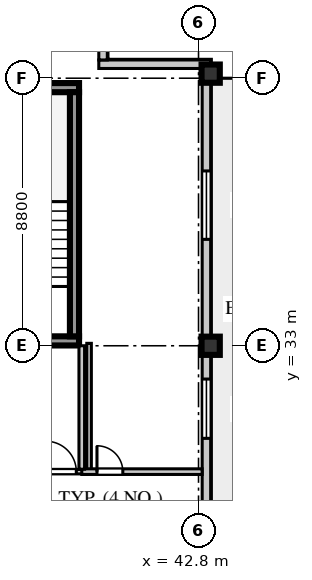
"""IFC4 building model, lengths in metres.
Left out: names, types, materials, properties, quantities, classifications, styles, units other than length and angle.
Written with IfcOpenShell. Run it as: python <this file> out.ifc"""

import sys

from ifc_helpers import new_model, si_unit, direction, frame, frame_2d, origin, origin_2d, place, context, subcontext, project, spatial, rectangle, extrude, element, fill, save


model = new_model("IFC4")
c1 = context("Model", 3, precision=1e-05, world=origin(), true_north=direction((0.0, 1.0)))
c2 = subcontext(c1, "Body", "Model", "MODEL_VIEW")
j1 = project(units=[si_unit("LENGTHUNIT", "METRE"), si_unit("PLANEANGLEUNIT", "RADIAN")], contexts=[c1])
p1 = place(None, origin())
s1 = spatial("IfcSite", under=j1, at=p1, CompositionType="ELEMENT")
p2 = place(p1, origin())
s2 = spatial("IfcBuilding", under=s1, at=p2, CompositionType="ELEMENT")
p3 = place(p2, frame((0.0, 0.0, 335.3)))
s3 = spatial("IfcBuildingStorey", under=s2, at=p3, CompositionType="ELEMENT", Elevation=335.3)
p4 = place(p3, frame((34.125, 33.16, 0.0), z_axis=(0.0, 0.0, 1.0), x_axis=(1.0, 0.0, 0.0)))
e1 = element("IfcWall", 1, at=p4, inside=s3, PredefinedType="SHEAR", context=c2, shape_type="SweptSolid", body=[
    extrude(rectangle(XDim=4.745, YDim=0.3, at=frame_2d((2.373, 0.0))), origin(), (0.0, 0.0, 1.0), 3.56),
])
p5 = place(p3, frame((34.83, 41.49, 0.0), z_axis=(0.0, 0.0, 1.0), x_axis=(1.0, 0.0, 0.0)))
e2 = element("IfcWall", 2, at=p5, inside=s3, PredefinedType="SHEAR", context=c2, shape_type="SweptSolid", body=[
    extrude(rectangle(XDim=4.04, YDim=0.3, at=frame_2d((2.02, 0.0))), origin(), (0.0, 0.0, 1.0), 3.56),
])
p6 = place(p3, frame((38.72, 33.31, 0.0), z_axis=(0.0, 0.0, 1.0), x_axis=(0.0, 1.0, 0.0)))
e3 = element("IfcWall", 3, at=p6, inside=s3, PredefinedType="SHEAR", context=c2, shape_type="SweptSolid", body=[
    extrude(rectangle(XDim=8.03, YDim=0.3, at=frame_2d((4.015, 0.0))), origin(), (0.0, 0.0, 1.0), 3.56),
])
for number, where, z_axis, x_axis in (
    (4, (43.2, 33.0, 0.0), (0.0, 0.0, 1.0), (1.0, 0.0, 0.0)),
    (5, (43.2, 41.95, 0.0), (0.0, 0.0, 1.0), (1.0, 0.0, 0.0)),
):
    element("IfcColumn", number, at=place(p3, frame(where, z_axis=z_axis, x_axis=x_axis)), inside=s3, PredefinedType="COLUMN", context=c2, shape_type="SweptSolid", body=[
        extrude(rectangle(XDim=0.6, YDim=0.6, at=origin_2d()), origin(), (0.0, 0.0, 1.0), 3.56),
    ])
p7 = place(p3, frame((43.06, 15.08, 0.0), z_axis=(0.0, 0.0, 1.0), x_axis=(0.0, 1.0, 0.0)))
e6 = element("IfcWall", 6, at=p7, inside=s3, PredefinedType="STANDARD", context=c2, shape_type="SweptSolid", body=[
    extrude(rectangle(XDim=27.04, YDim=0.28, at=frame_2d((13.52, 0.0))), origin(), (0.0, 0.0, 1.0), 2.92),
])
p8 = place(p7, frame((0.67, 0.0, 0.0)))
e7 = element("IfcOpeningElement", 7, at=p8, cuts=e6, PredefinedType="OPENING", context=c2, shape_type="SweptSolid", body=[
    extrude(rectangle(XDim=1.2, YDim=2.05, at=frame_2d((0.6, 1.025))), frame((0.0, 0.15, 0.0), z_axis=(0.0, -1.0, 0.0), x_axis=(1.0, 0.0, 0.0)), (0.0, 0.0, 1.0), 0.3),
])
p9 = place(p7, frame((2.755, 0.0, 0.8)))
e8 = element("IfcOpeningElement", 8, at=p9, cuts=e6, PredefinedType="OPENING", context=c2, shape_type="SweptSolid", body=[
    extrude(rectangle(XDim=2.1, YDim=1.95, at=frame_2d((1.05, 0.975))), frame((0.0, 0.15, 0.0), z_axis=(0.0, -1.0, 0.0), x_axis=(1.0, 0.0, 0.0)), (0.0, 0.0, 1.0), 0.3),
])
p10 = place(p7, frame((6.88, 0.0, 0.8)))
e9 = element("IfcOpeningElement", 9, at=p10, cuts=e6, PredefinedType="OPENING", context=c2, shape_type="SweptSolid", body=[
    extrude(rectangle(XDim=1.35, YDim=1.9, at=frame_2d((0.675, 0.95))), frame((0.0, 0.15, 0.0), z_axis=(0.0, -1.0, 0.0), x_axis=(1.0, 0.0, 0.0)), (0.0, 0.0, 1.0), 0.3),
])
p11 = place(p7, frame((10.045, 0.0, 0.8)))
e10 = element("IfcOpeningElement", 10, at=p11, cuts=e6, PredefinedType="OPENING", context=c2, shape_type="SweptSolid", body=[
    extrude(rectangle(XDim=1.2, YDim=1.75, at=frame_2d((0.6, 0.875))), frame((0.0, 0.15, 0.0), z_axis=(0.0, -1.0, 0.0), x_axis=(1.0, 0.0, 0.0)), (0.0, 0.0, 1.0), 0.3),
])
p12 = place(p7, frame((14.875, 0.0, 0.8)))
e11 = element("IfcOpeningElement", 11, at=p12, cuts=e6, PredefinedType="OPENING", context=c2, shape_type="SweptSolid", body=[
    extrude(rectangle(XDim=1.95, YDim=2.0, at=frame_2d((0.975, 1.0))), frame((0.0, 0.15, 0.0), z_axis=(0.0, -1.0, 0.0), x_axis=(1.0, 0.0, 0.0)), (0.0, 0.0, 1.0), 0.3),
])
p13 = place(p7, frame((21.42, 0.0, 0.8)))
e12 = element("IfcOpeningElement", 12, at=p13, cuts=e6, PredefinedType="OPENING", context=c2, shape_type="SweptSolid", body=[
    extrude(rectangle(XDim=2.25, YDim=2.0, at=frame_2d((1.125, 1.0))), frame((0.0, 0.15, 0.0), z_axis=(0.0, -1.0, 0.0), x_axis=(1.0, 0.0, 0.0)), (0.0, 0.0, 1.0), 0.3),
])
p14 = place(p3, frame((43.2, 42.26, 0.0), z_axis=(0.0, 0.0, 1.0), x_axis=(-1.0, 0.0, 0.0)))
e13 = element("IfcWall", 13, at=p14, inside=s3, PredefinedType="STANDARD", context=c2, shape_type="SweptSolid", body=[
    extrude(rectangle(XDim=3.68, YDim=0.28, at=frame_2d((1.84, 0.0))), origin(), (0.0, 0.0, 1.0), 2.92),
])
p15 = place(p3, frame((39.66, 42.4, 0.0), z_axis=(0.0, 0.0, 1.0), x_axis=(0.0, 1.0, 0.0)))
e14 = element("IfcWall", 14, at=p15, inside=s3, PredefinedType="STANDARD", context=c2, shape_type="SweptSolid", body=[
    extrude(rectangle(XDim=3.12, YDim=0.28, at=frame_2d((1.56, 0.0))), origin(), (0.0, 0.0, 1.0), 2.92),
])
p16 = place(p3, frame((39.2, 28.86, 0.0), z_axis=(0.0, 0.0, 1.0), x_axis=(0.0, 1.0, 0.0)))
e15 = element("IfcWall", 15, at=p16, inside=s3, PredefinedType="PARTITIONING", context=c2, shape_type="SweptSolid", body=[
    extrude(rectangle(XDim=4.22, YDim=0.15, at=frame_2d((2.11, 0.0))), origin(), (0.0, 0.0, 1.0), 3.56),
])
p17 = place(p3, frame((37.48, 28.86, 0.0), z_axis=(0.0, 0.0, 1.0), x_axis=(1.0, 0.0, 0.0)))
e16 = element("IfcWall", 16, at=p17, inside=s3, PredefinedType="PARTITIONING", context=c2, shape_type="SweptSolid", body=[
    extrude(rectangle(XDim=1.64, YDim=0.15, at=frame_2d((0.82, 0.0))), origin(), (0.0, 0.0, 1.0), 3.56),
])
p18 = place(p17, frame((0.3, 0.0, 0.0)))
e17 = element("IfcOpeningElement", 17, at=p18, cuts=e16, PredefinedType="OPENING", context=c2, shape_type="SweptSolid", body=[
    extrude(rectangle(XDim=1.0, YDim=2.1, at=frame_2d((0.5, 1.05))), frame((0.0, 0.085, 0.0), z_axis=(0.0, -1.0, 0.0), x_axis=(1.0, 0.0, 0.0)), (0.0, 0.0, 1.0), 0.17),
])
p19 = place(p3, frame((38.96, 28.86, 0.0), z_axis=(0.0, 0.0, 1.0), x_axis=(1.0, 0.0, 0.0)))
e18 = element("IfcWall", 18, at=p19, inside=s3, PredefinedType="SOLIDWALL", context=c2, shape_type="SweptSolid", body=[
    extrude(rectangle(XDim=3.96, YDim=0.185, at=frame_2d((1.98, 0.0))), origin(), (0.0, 0.0, 1.0), 3.56),
])
p20 = place(p19, frame((0.5, 0.0, 0.0)))
e19 = element("IfcOpeningElement", 19, at=p20, cuts=e18, PredefinedType="OPENING", context=c2, shape_type="SweptSolid", body=[
    extrude(rectangle(XDim=0.85, YDim=2.05, at=frame_2d((0.425, 1.025))), frame((0.0, 0.103, 0.0), z_axis=(0.0, -1.0, 0.0), x_axis=(1.0, 0.0, 0.0)), (0.0, 0.0, 1.0), 0.205),
])
p21 = place(p3, frame((38.96, 28.94, 0.0), z_axis=(0.0, 0.0, 1.0), x_axis=(0.0, 1.0, 0.0)))
e20 = element("IfcWall", 20, at=p21, inside=s3, PredefinedType="SOLIDWALL", context=c2, shape_type="SweptSolid", body=[
    extrude(rectangle(XDim=4.06, YDim=0.185, at=frame_2d((2.03, 0.0))), origin(), (0.0, 0.0, 1.0), 3.56),
])
p22 = place(p12, origin())
e21 = element("IfcWindow", 21, at=p22, inside=s3, PartitioningType="SINGLE_PANEL", PredefinedType="WINDOW", context=c2, shape_type="SweptSolid", body=[
    extrude(rectangle(XDim=1.95, YDim=2.0, at=frame_2d((0.975, 1.0))), frame((0.0, 0.03, 0.0), z_axis=(0.0, -1.0, 0.0), x_axis=(1.0, 0.0, 0.0)), (0.0, 0.0, 1.0), 0.06),
])
fill(e11, e21)
p23 = place(p13, origin())
e22 = element("IfcWindow", 22, at=p23, inside=s3, PartitioningType="SINGLE_PANEL", PredefinedType="WINDOW", context=c2, shape_type="SweptSolid", body=[
    extrude(rectangle(XDim=2.25, YDim=2.0, at=frame_2d((1.125, 1.0))), frame((0.0, 0.03, 0.0), z_axis=(0.0, -1.0, 0.0), x_axis=(1.0, 0.0, 0.0)), (0.0, 0.0, 1.0), 0.06),
])
fill(e12, e22)
p24 = place(p18, origin())
e23 = element("IfcDoor", 23, at=p24, inside=s3, OperationType="SINGLE_SWING_LEFT", PredefinedType="DOOR", context=c2, shape_type="SweptSolid", body=[
    extrude(rectangle(XDim=1.0, YDim=2.1, at=frame_2d((0.5, 1.05))), frame((0.0, 0.025, 0.0), z_axis=(0.0, -1.0, 0.0), x_axis=(1.0, 0.0, 0.0)), (0.0, 0.0, 1.0), 0.05),
])
fill(e17, e23)
p25 = place(p20, origin())
e24 = element("IfcDoor", 24, at=p25, inside=s3, OperationType="SINGLE_SWING_LEFT", PredefinedType="DOOR", context=c2, shape_type="SweptSolid", body=[
    extrude(rectangle(XDim=0.85, YDim=2.05, at=frame_2d((0.425, 1.025))), frame((0.0, 0.025, 0.0), z_axis=(0.0, -1.0, 0.0), x_axis=(1.0, 0.0, 0.0)), (0.0, 0.0, 1.0), 0.05),
])
fill(e19, e24)
save(model, sys.argv[1])
